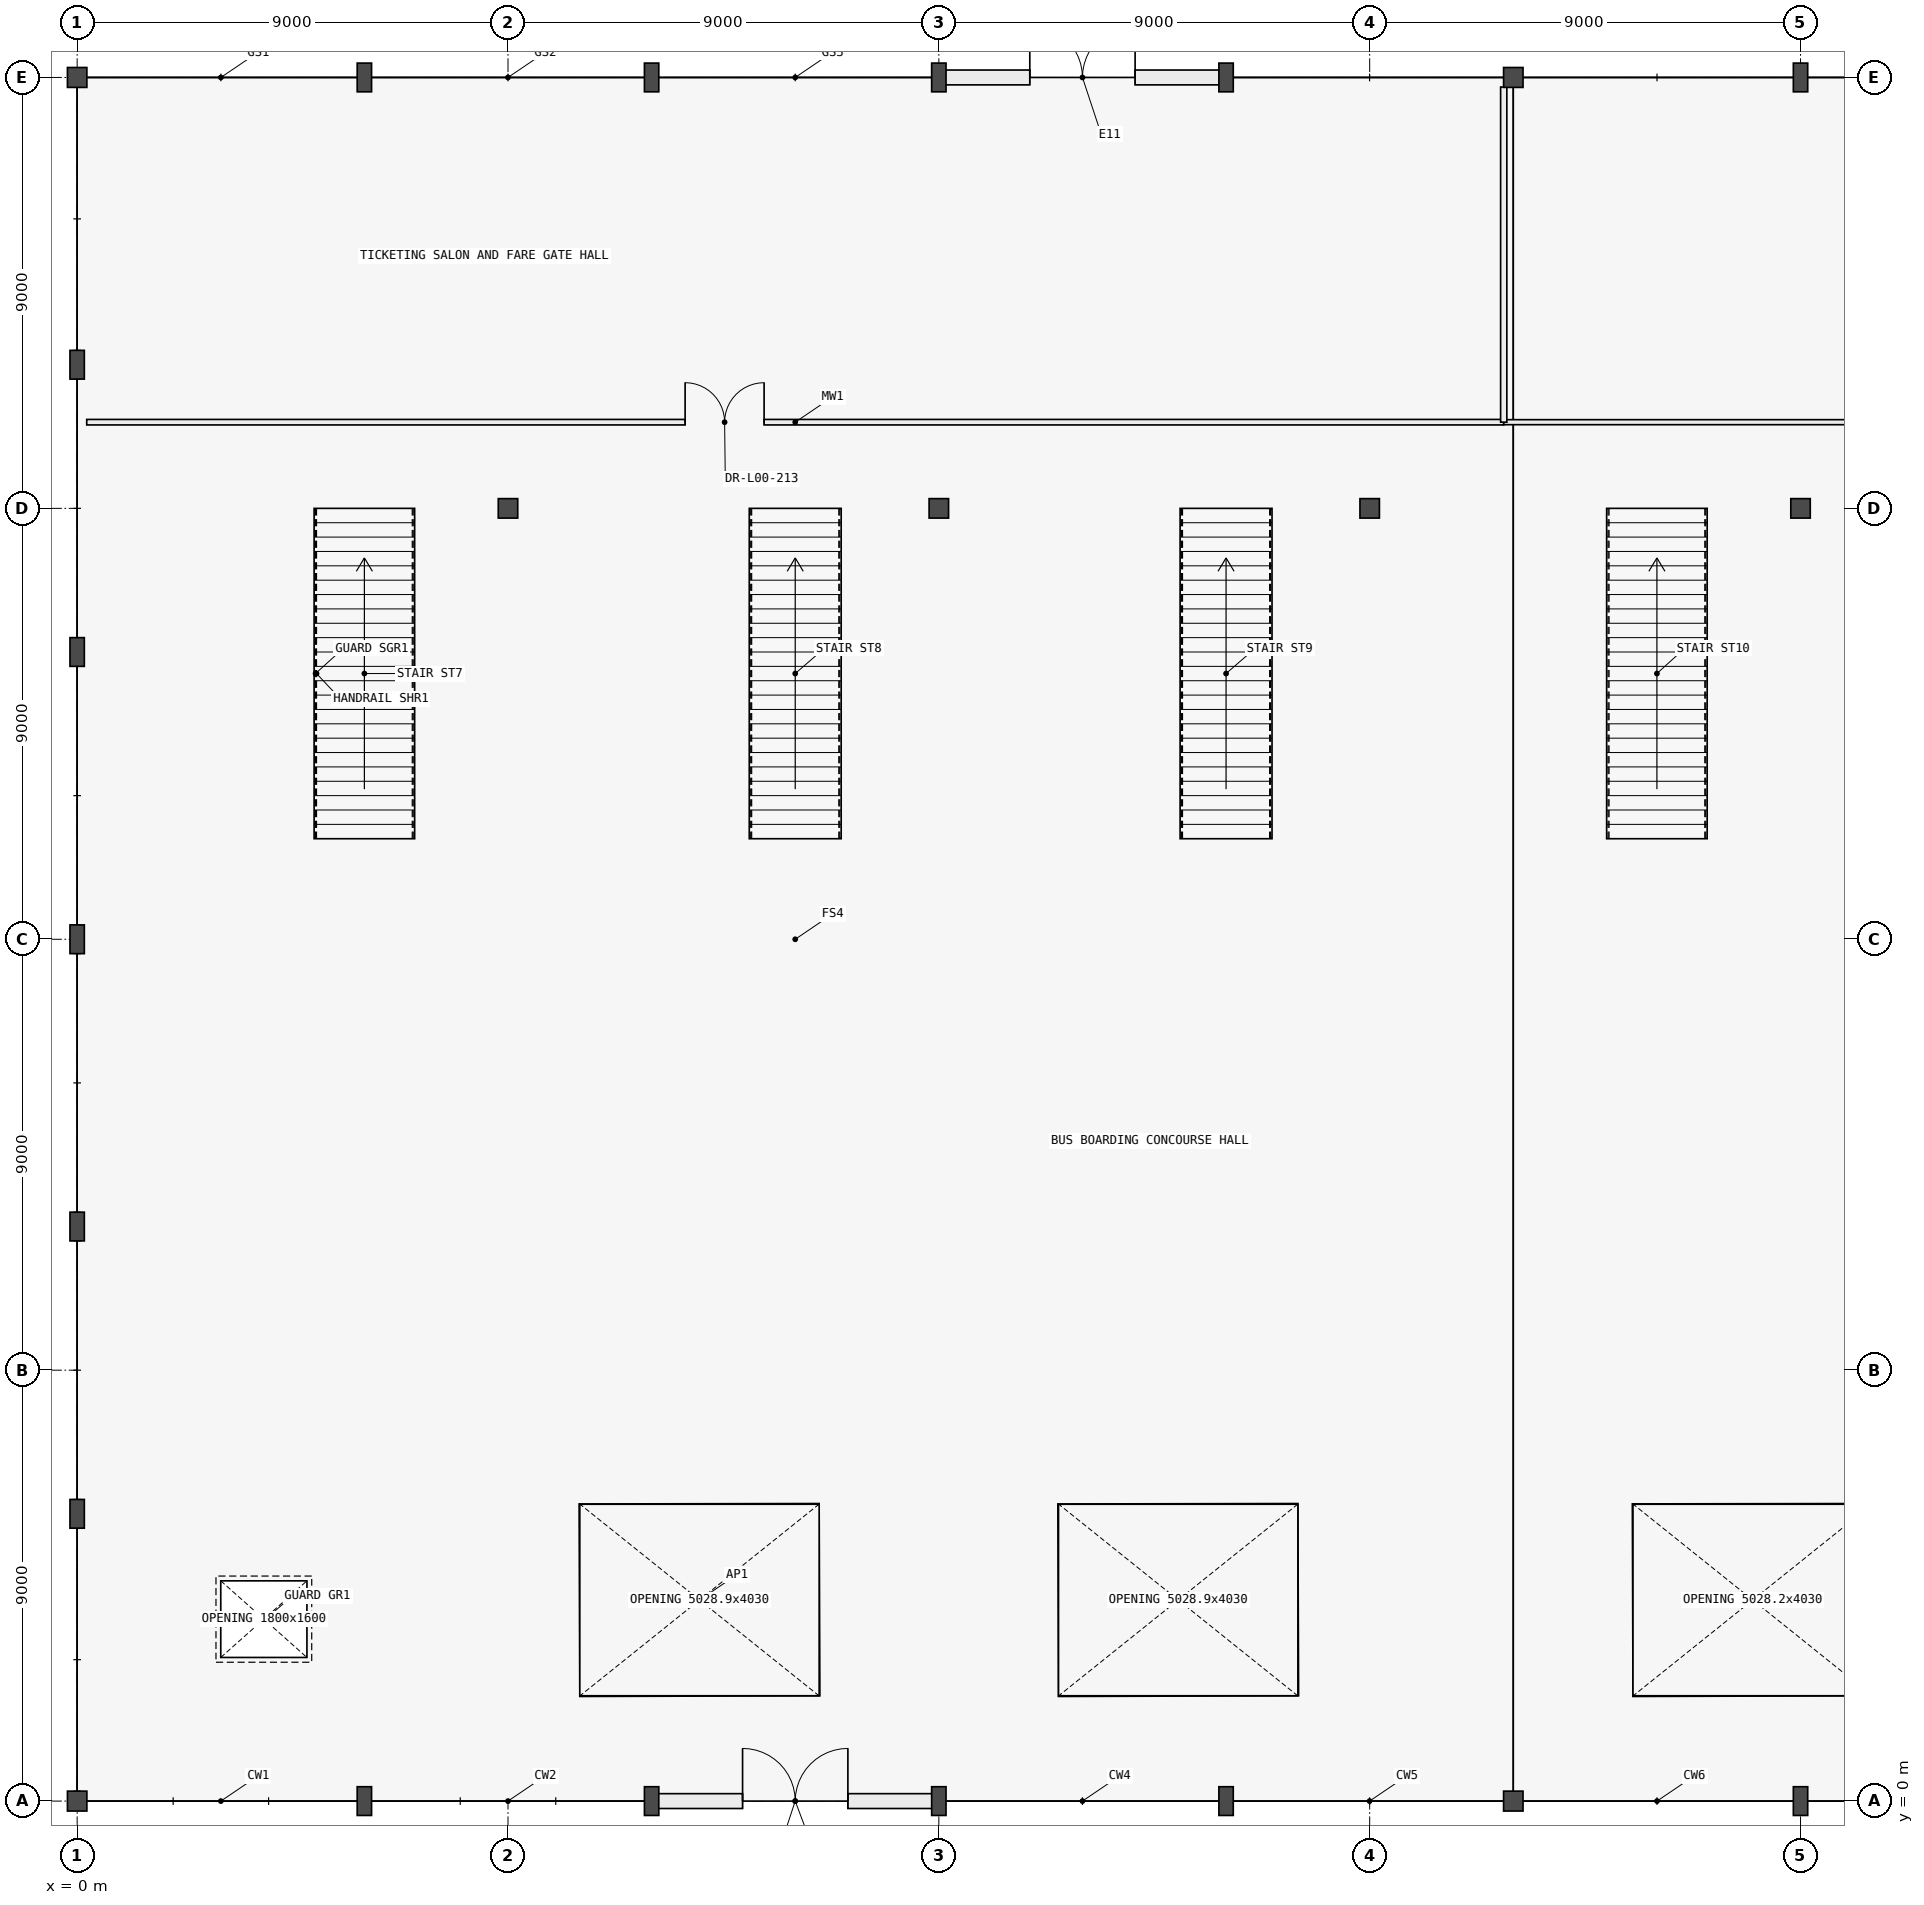
"""IFC4 building model, lengths in metres.
Left out: names, types, materials, properties, quantities, classifications, styles, units other than length and angle.
Written with IfcOpenShell. Run it as: python <this file> out.ifc"""

import sys

from ifc_helpers import new_model, si_unit, direction, frame, frame_2d, origin, origin_2d, place, context, subcontext, project, spatial, rectangle, hollow_circle, i_section, extrude, element, fill, save


model = new_model("IFC4")
c1 = context("Model", 3, precision=1e-05, world=origin(), true_north=direction((0.0, 1.0)))
c2 = subcontext(c1, "Body", "Model", "MODEL_VIEW")
j1 = project(units=[si_unit("LENGTHUNIT", "METRE"), si_unit("PLANEANGLEUNIT", "RADIAN")], contexts=[c1])
p1 = place(None, origin())
s1 = spatial("IfcSite", under=j1, at=p1, CompositionType="ELEMENT")
p2 = place(p1, origin())
s2 = spatial("IfcBuilding", under=s1, at=p2, CompositionType="ELEMENT")
p3 = place(p2, origin())
s3 = spatial("IfcBuildingStorey", under=s2, at=p3, CompositionType="ELEMENT", Elevation=0.0)
for number, where, z_axis, x_axis in (
    (1, (0.0, 0.0, 0.0), (0.0, 0.0, 1.0), (1.0, 0.0, 0.0)),
    (2, (0.0, 36.0, 0.0), (0.0, 0.0, 1.0), (1.0, 0.0, 0.0)),
    (3, (30.0, 0.0, 0.0), (0.0, 0.0, 1.0), (1.0, 0.0, 0.0)),
    (4, (30.0, 36.0, 0.0), (0.0, 0.0, 1.0), (1.0, 0.0, 0.0)),
):
    element("IfcColumn", number, at=place(p3, frame(where, z_axis=z_axis, x_axis=x_axis)), inside=s3, PredefinedType="COLUMN", context=c2, shape_type="SweptSolid", body=[
        extrude(i_section(OverallWidth=0.406, OverallDepth=0.416, WebThickness=0.024, FlangeThickness=0.039, FilletRadius=0.015, at=origin_2d()), origin(), (0.0, 0.0, 1.0), 4.2),
    ])
for number, where, z_axis, x_axis in (
    (5, (6.0, 0.0, 0.0), (0.0, 0.0, 1.0), (1.0, 0.0, 0.0)),
    (6, (6.0, 36.0, 0.0), (0.0, 0.0, 1.0), (1.0, 0.0, 0.0)),
    (7, (12.0, 0.0, 0.0), (0.0, 0.0, 1.0), (1.0, 0.0, 0.0)),
    (8, (12.0, 36.0, 0.0), (0.0, 0.0, 1.0), (1.0, 0.0, 0.0)),
    (9, (18.0, 0.0, 0.0), (0.0, 0.0, 1.0), (1.0, 0.0, 0.0)),
    (10, (18.0, 36.0, 0.0), (0.0, 0.0, 1.0), (1.0, 0.0, 0.0)),
    (11, (24.0, 0.0, 0.0), (0.0, 0.0, 1.0), (1.0, 0.0, 0.0)),
    (12, (24.0, 36.0, 0.0), (0.0, 0.0, 1.0), (1.0, 0.0, 0.0)),
    (13, (36.0, 0.0, 0.0), (0.0, 0.0, 1.0), (1.0, 0.0, 0.0)),
    (14, (36.0, 36.0, 0.0), (0.0, 0.0, 1.0), (1.0, 0.0, 0.0)),
    (15, (0.0, 6.0, 0.0), (0.0, 0.0, 1.0), (1.0, 0.0, 0.0)),
    (16, (0.0, 12.0, 0.0), (0.0, 0.0, 1.0), (1.0, 0.0, 0.0)),
    (17, (0.0, 18.0, 0.0), (0.0, 0.0, 1.0), (1.0, 0.0, 0.0)),
    (18, (0.0, 24.0, 0.0), (0.0, 0.0, 1.0), (1.0, 0.0, 0.0)),
    (19, (0.0, 30.0, 0.0), (0.0, 0.0, 1.0), (1.0, 0.0, 0.0)),
):
    element("IfcColumn", number, at=place(p3, frame(where, z_axis=z_axis, x_axis=x_axis)), inside=s3, PredefinedType="COLUMN", context=c2, shape_type="SweptSolid", body=[
        extrude(i_section(OverallWidth=0.3, OverallDepth=0.6, WebThickness=0.015, FlangeThickness=0.03, FilletRadius=0.027, at=origin_2d()), origin(), (0.0, 0.0, 1.0), 4.2),
    ])
for number, where, z_axis, x_axis in (
    (20, (9.0, 27.0, 0.0), (0.0, 0.0, 1.0), (1.0, 0.0, 0.0)),
    (21, (18.0, 27.0, 0.0), (0.0, 0.0, 1.0), (1.0, 0.0, 0.0)),
    (22, (27.0, 27.0, 0.0), (0.0, 0.0, 1.0), (1.0, 0.0, 0.0)),
    (23, (36.0, 27.0, 0.0), (0.0, 0.0, 1.0), (1.0, 0.0, 0.0)),
):
    element("IfcColumn", number, at=place(p3, frame(where, z_axis=z_axis, x_axis=x_axis)), inside=s3, PredefinedType="COLUMN", context=c2, shape_type="SweptSolid", body=[
        extrude(hollow_circle(Radius=0.203, WallThickness=0.016, at=origin_2d()), origin(), (0.0, 0.0, 1.0), 4.2),
    ])
p4 = place(p3, frame((12.008, 0.0, 0.0), z_axis=(0.0, 0.0, 1.0), x_axis=(1.0, 0.0, 0.0)))
e24 = element("IfcWall", 24, at=p4, inside=s3, PredefinedType="STANDARD", context=c2, shape_type="SweptSolid", body=[
    extrude(rectangle(XDim=5.984, YDim=0.31, at=frame_2d((2.992, 0.0))), origin(), (0.0, 0.0, 1.0), 3.085),
])
p5 = place(p4, frame((1.892, 0.0, 0.0)))
e25 = element("IfcOpeningElement", 25, at=p5, cuts=e24, PredefinedType="OPENING", context=c2, shape_type="SweptSolid", body=[
    extrude(rectangle(XDim=2.2, YDim=2.4, at=frame_2d((1.1, 1.2))), frame((0.0, 0.165, 0.0), z_axis=(0.0, -1.0, 0.0), x_axis=(1.0, 0.0, 0.0)), (0.0, 0.0, 1.0), 0.33),
])
p6 = place(p3, frame((18.008, 36.0, 0.0), z_axis=(0.0, 0.0, 1.0), x_axis=(1.0, 0.0, 0.0)))
e26 = element("IfcWall", 26, at=p6, inside=s3, PredefinedType="STANDARD", context=c2, shape_type="SweptSolid", body=[
    extrude(rectangle(XDim=5.984, YDim=0.31, at=frame_2d((2.992, 0.0))), origin(), (0.0, 0.0, 1.0), 3.085),
])
p7 = place(p6, frame((1.892, 0.0, 0.0)))
e27 = element("IfcOpeningElement", 27, at=p7, cuts=e26, PredefinedType="OPENING", context=c2, shape_type="SweptSolid", body=[
    extrude(rectangle(XDim=2.2, YDim=2.4, at=frame_2d((1.1, 1.2))), frame((0.0, 0.165, 0.0), z_axis=(0.0, -1.0, 0.0), x_axis=(1.0, 0.0, 0.0)), (0.0, 0.0, 1.0), 0.33),
])
p8 = place(p3, frame((0.2, 28.8, 0.0), z_axis=(0.0, 0.0, 1.0), x_axis=(1.0, 0.0, 0.0)))
e28 = element("IfcWall", 28, at=p8, inside=s3, PredefinedType="MOVABLE", context=c2, shape_type="SweptSolid", body=[
    extrude(rectangle(XDim=29.6, YDim=0.115, at=frame_2d((14.8, 0.0))), origin(), (0.0, 0.0, 1.0), 3.95),
])
p9 = place(p8, frame((12.5, 0.0, 0.0)))
e29 = element("IfcOpeningElement", 29, at=p9, cuts=e28, PredefinedType="OPENING", context=c2, shape_type="SweptSolid", body=[
    extrude(rectangle(XDim=1.65, YDim=2.25, at=frame_2d((0.825, 1.125))), frame((0.0, 0.067, 0.0), z_axis=(0.0, -1.0, 0.0), x_axis=(1.0, 0.0, 0.0)), (0.0, 0.0, 1.0), 0.135),
])
p10 = place(p3, frame((29.8, 28.8, 0.0), z_axis=(0.0, 0.0, 1.0), x_axis=(1.0, 0.0, 0.0)))
e30 = element("IfcWall", 30, at=p10, inside=s3, PredefinedType="MOVABLE", context=c2, shape_type="SweptSolid", body=[
    extrude(rectangle(XDim=30.0, YDim=0.105, at=frame_2d((15.0, 0.0))), origin(), (0.0, 0.0, 1.0), 3.95),
])
p11 = place(p10, frame((13.5, 0.0, 0.0)))
e31 = element("IfcOpeningElement", 31, at=p11, cuts=e30, PredefinedType="OPENING", context=c2, shape_type="SweptSolid", body=[
    extrude(rectangle(XDim=1.75, YDim=2.25, at=frame_2d((0.875, 1.125))), frame((0.0, 0.062, 0.0), z_axis=(0.0, -1.0, 0.0), x_axis=(1.0, 0.0, 0.0)), (0.0, 0.0, 1.0), 0.125),
])
p12 = place(p3, frame((29.8, 28.8, 0.0), z_axis=(0.0, 0.0, 1.0), x_axis=(0.0, 1.0, 0.0)))
e32 = element("IfcWall", 32, at=p12, inside=s3, PredefinedType="PARTITIONING", context=c2, shape_type="SweptSolid", body=[
    extrude(rectangle(XDim=7.0, YDim=0.13, at=frame_2d((3.5, 0.0))), origin(), (0.0, 0.0, 1.0), 3.95),
])
p13 = place(p5, frame((2.2, 0.0, 0.0), z_axis=(0.0, 0.0, 1.0), x_axis=(-1.0, 0.0, 0.0)))
e33 = element("IfcDoor", 33, at=p13, inside=s3, OperationType="DOUBLE_DOOR_SINGLE_SWING", PredefinedType="DOOR", context=c2, shape_type="SweptSolid", body=[
    extrude(rectangle(XDim=2.2, YDim=2.4, at=frame_2d((1.1, 1.2))), frame((0.0, 0.025, 0.0), z_axis=(0.0, -1.0, 0.0), x_axis=(1.0, 0.0, 0.0)), (0.0, 0.0, 1.0), 0.05),
])
fill(e25, e33)
p14 = place(p7, origin())
e34 = element("IfcDoor", 34, at=p14, inside=s3, OperationType="DOUBLE_DOOR_SINGLE_SWING", PredefinedType="DOOR", context=c2, shape_type="SweptSolid", body=[
    extrude(rectangle(XDim=2.2, YDim=2.4, at=frame_2d((1.1, 1.2))), frame((0.0, 0.025, 0.0), z_axis=(0.0, -1.0, 0.0), x_axis=(1.0, 0.0, 0.0)), (0.0, 0.0, 1.0), 0.05),
])
fill(e27, e34)
p15 = place(p9, origin())
e35 = element("IfcDoor", 35, at=p15, inside=s3, OperationType="DOUBLE_DOOR_SINGLE_SWING", PredefinedType="DOOR", context=c2, shape_type="SweptSolid", body=[
    extrude(rectangle(XDim=1.65, YDim=2.25, at=frame_2d((0.825, 1.125))), frame((0.0, 0.025, 0.0), z_axis=(0.0, -1.0, 0.0), x_axis=(1.0, 0.0, 0.0)), (0.0, 0.0, 1.0), 0.05),
])
fill(e29, e35)
save(model, sys.argv[1])
